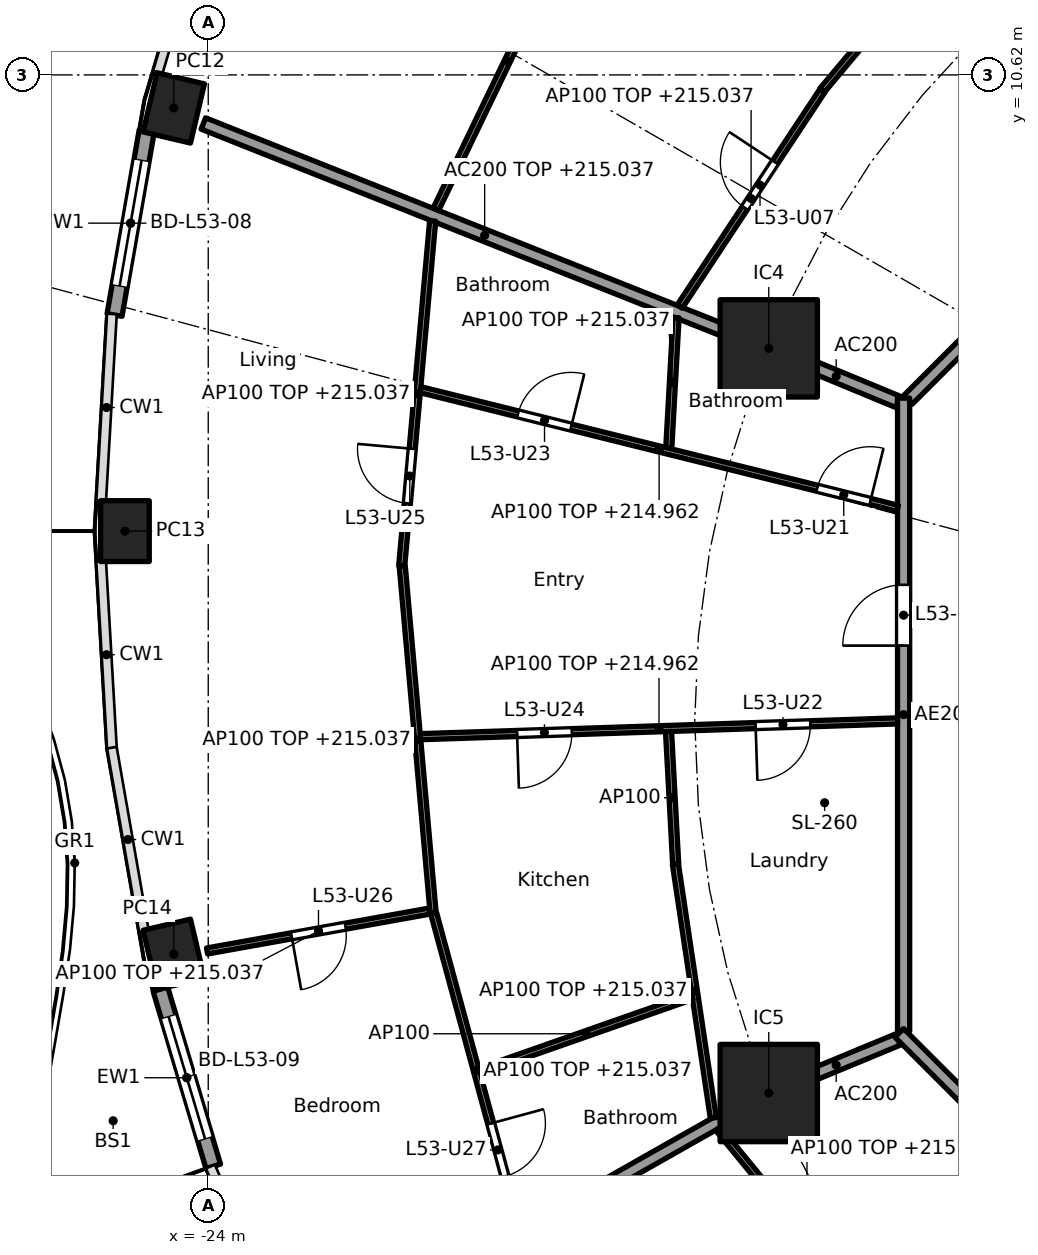
"""IFC4 building model, lengths in metres.
Left out: names, types, materials, properties, quantities, classifications, styles, units other than length and angle.
Written with IfcOpenShell. Run it as: python <this file> out.ifc"""

import sys

from ifc_helpers import new_model, si_unit, direction, frame, frame_2d, origin, origin_2d, place, context, subcontext, project, spatial, rectangle, hollow_rectangle, extrude, element, fill, save


model = new_model("IFC4")
c1 = context("Model", 3, precision=1e-05, world=origin(), true_north=direction((0.0, 1.0)))
c2 = subcontext(c1, "Body", "Model", "MODEL_VIEW")
j1 = project(units=[si_unit("LENGTHUNIT", "METRE"), si_unit("PLANEANGLEUNIT", "RADIAN")], contexts=[c1])
p1 = place(None, origin())
s1 = spatial("IfcSite", under=j1, at=p1, CompositionType="ELEMENT")
p2 = place(p1, origin())
s2 = spatial("IfcBuilding", under=s1, at=p2, CompositionType="ELEMENT")
p3 = place(p2, frame((0.0, 0.0, 212.2)))
s3 = spatial("IfcBuildingStorey", under=s2, at=p3, CompositionType="ELEMENT", Elevation=212.2)
for number, where, z_axis, x_axis in (
    (1, (-24.567, 10.077, -0.26), (0.0, 0.0, 1.0), (-0.229, -0.973, 0.0)),
    (2, (-25.37, 3.118, -0.26), (0.0, 0.0, 1.0), (0.0, -1.0, 0.0)),
    (3, (-24.567, -3.842, -0.26), (0.0, 0.0, 1.0), (0.229, -0.973, 0.0)),
):
    element("IfcColumn", number, at=place(p3, frame(where, z_axis=z_axis, x_axis=x_axis)), inside=s3, PredefinedType="COLUMN", context=c2, shape_type="SweptSolid", body=[
        extrude(hollow_rectangle(XDim=1.0, YDim=0.8, WallThickness=0.032, at=origin_2d()), origin(), (0.0, 0.0, 1.0), 3.96),
    ])
for number, where, z_axis, x_axis in (
    (4, (-14.782, 6.123, 0.0), (0.0, 0.0, 1.0), (1.0, 0.0, 0.0)),
    (5, (-14.782, -6.123, 0.0), (0.0, 0.0, 1.0), (1.0, 0.0, 0.0)),
):
    element("IfcColumn", number, at=place(p3, frame(where, z_axis=z_axis, x_axis=x_axis)), inside=s3, PredefinedType="COLUMN", context=c2, shape_type="SweptSolid", body=[
        extrude(rectangle(XDim=1.6, YDim=1.6, at=origin_2d()), origin(), (0.0, 0.0, 1.0), 3.7),
    ])
p4 = place(p3, frame((-25.541, 6.671, 0.0), z_axis=(0.0, 0.0, 1.0), x_axis=(0.172254823677, 0.985052422828, 0.0)))
e6 = element("IfcWall", 6, at=p4, inside=s3, PredefinedType="SOLIDWALL", context=c2, shape_type="SweptSolid", body=[
    extrude(rectangle(XDim=3.067, YDim=0.25, at=frame_2d((1.534, 0.0))), origin(), (0.0, 0.0, 1.0), 3.44),
])
p5 = place(p4, frame((0.484, 0.0, 0.0)))
e7 = element("IfcOpeningElement", 7, at=p5, cuts=e6, PredefinedType="OPENING", context=c2, shape_type="SweptSolid", body=[
    extrude(rectangle(XDim=2.1, YDim=2.4, at=frame_2d((1.05, 1.2))), frame((0.0, 0.135, 0.0), z_axis=(0.0, -1.0, 0.0), x_axis=(1.0, 0.0, 0.0)), (0.0, 0.0, 1.0), 0.27),
])
p6 = place(p3, frame((-23.918, -7.328, 0.0), z_axis=(0.0, 0.0, 1.0), x_axis=(-0.285859454825, 0.95827155446, 0.0)))
e8 = element("IfcWall", 8, at=p6, inside=s3, PredefinedType="SOLIDWALL", context=c2, shape_type="SweptSolid", body=[
    extrude(rectangle(XDim=3.041, YDim=0.25, at=frame_2d((1.52, 0.0))), origin(), (0.0, 0.0, 1.0), 3.44),
])
p7 = place(p6, frame((0.47, 0.0, 0.0)))
e9 = element("IfcOpeningElement", 9, at=p7, cuts=e8, PredefinedType="OPENING", context=c2, shape_type="SweptSolid", body=[
    extrude(rectangle(XDim=2.1, YDim=2.4, at=frame_2d((1.05, 1.2))), frame((0.0, 0.135, 0.0), z_axis=(0.0, -1.0, 0.0), x_axis=(1.0, 0.0, 0.0)), (0.0, 0.0, 1.0), 0.27),
])
p8 = place(p3, frame((-12.657, 5.243, 0.0), z_axis=(0.0, 0.0, 1.0), x_axis=(-0.923859888513, 0.38273085373, 0.0)))
e10 = element("IfcWall", 10, at=p8, inside=s3, PredefinedType="PARTITIONING", context=c2, shape_type="SweptSolid", body=[
    extrude(rectangle(XDim=2.199, YDim=0.2, at=frame_2d((1.1, 0.0))), origin(), (0.0, 0.0, 1.0), 3.44),
])
p9 = place(p3, frame((-14.829, 6.141, 0.0), z_axis=(0.0, 0.0, 1.0), x_axis=(-0.929202069098, 0.36957206981, 0.0)))
e11 = element("IfcWall", 11, at=p9, inside=s3, PredefinedType="PARTITIONING", context=c2, shape_type="SweptSolid", body=[
    extrude(rectangle(XDim=9.957, YDim=0.2, at=frame_2d((4.978, 0.0))), origin(), (0.0, 0.0, 1.0), 2.837),
])
p10 = place(p3, frame((-12.657, -5.243, 0.0), z_axis=(0.0, 0.0, 1.0), x_axis=(-0.923859888513, -0.38273085373, 0.0)))
e12 = element("IfcWall", 12, at=p10, inside=s3, PredefinedType="PARTITIONING", context=c2, shape_type="SweptSolid", body=[
    extrude(rectangle(XDim=2.199, YDim=0.2, at=frame_2d((1.1, 0.0))), origin(), (0.0, 0.0, 1.0), 3.44),
])
p11 = place(p3, frame((-14.825, -6.148, 0.0), z_axis=(0.0, 0.0, 1.0), x_axis=(-0.870099576105, -0.492875975944, 0.0)))
e13 = element("IfcWall", 13, at=p11, inside=s3, PredefinedType="PARTITIONING", context=c2, shape_type="SweptSolid", body=[
    extrude(rectangle(XDim=7.937, YDim=0.2, at=frame_2d((3.969, 0.0))), origin(), (0.0, 0.0, 1.0), 2.837),
])
p12 = place(p3, frame((-5.275, 12.494, 0.0), z_axis=(0.0, 0.0, 1.0), x_axis=(-0.707106781187, -0.707106781187, 0.0)))
e14 = element("IfcWall", 14, at=p12, inside=s3, PredefinedType="PARTITIONING", context=c2, shape_type="SweptSolid", body=[
    extrude(rectangle(XDim=10.209, YDim=0.2, at=frame_2d((5.104, 0.0))), origin(), (0.0, 0.0, 1.0), 3.44),
])
p13 = place(p12, frame((1.185, 0.0, 0.0)))
e15 = element("IfcOpeningElement", 15, at=p13, cuts=e14, PredefinedType="OPENING", context=c2, shape_type="SweptSolid", body=[
    extrude(rectangle(XDim=1.0, YDim=2.1, at=frame_2d((0.5, 1.05))), frame((0.0, 0.11, 0.0), z_axis=(0.0, -1.0, 0.0), x_axis=(1.0, 0.0, 0.0)), (0.0, 0.0, 1.0), 0.22),
])
p14 = place(p3, frame((-12.565, 5.304, 0.0), z_axis=(0.0, 0.0, 1.0), x_axis=(0.0, -1.0, 0.0)))
e16 = element("IfcWall", 16, at=p14, inside=s3, PredefinedType="PARTITIONING", context=c2, shape_type="SweptSolid", body=[
    extrude(rectangle(XDim=10.409, YDim=0.2, at=frame_2d((5.205, 0.0))), origin(), (0.0, 0.0, 1.0), 3.44),
])
p15 = place(p14, frame((3.07, 0.0, 0.0)))
e17 = element("IfcOpeningElement", 17, at=p15, cuts=e16, PredefinedType="OPENING", context=c2, shape_type="SweptSolid", body=[
    extrude(rectangle(XDim=1.0, YDim=2.1, at=frame_2d((0.5, 1.05))), frame((0.0, 0.11, 0.0), z_axis=(0.0, -1.0, 0.0), x_axis=(1.0, 0.0, 0.0)), (0.0, 0.0, 1.0), 0.22),
])
p16 = place(p3, frame((-12.635, -5.134, 0.0), z_axis=(0.0, 0.0, 1.0), x_axis=(0.707106781187, -0.707106781187, 0.0)))
e18 = element("IfcWall", 18, at=p16, inside=s3, PredefinedType="PARTITIONING", context=c2, shape_type="SweptSolid", body=[
    extrude(rectangle(XDim=10.609, YDim=0.2, at=frame_2d((5.305, 0.0))), origin(), (0.0, 0.0, 1.0), 3.44),
])
p17 = place(p3, frame((-7.725, 10.186, 0.0), z_axis=(0.0, 0.0, 1.0), x_axis=(-0.669819599194, 0.742523874725, 0.0)))
e19 = element("IfcWall", 19, at=p17, inside=s3, PredefinedType="PARTITIONING", context=c2, shape_type="SweptSolid", body=[
    extrude(rectangle(XDim=10.282, YDim=0.1, at=frame_2d((5.141, 0.0))), origin(), (0.0, 0.0, 1.0), 2.762),
])
p18 = place(p17, frame((2.0, 0.0, 0.0)))
e20 = element("IfcOpeningElement", 20, at=p18, cuts=e19, PredefinedType="OPENING", context=c2, shape_type="SweptSolid", body=[
    extrude(rectangle(XDim=0.9, YDim=2.1, at=frame_2d((0.45, 1.05))), frame((0.0, 0.06, 0.0), z_axis=(0.0, -1.0, 0.0), x_axis=(1.0, 0.0, 0.0)), (0.0, 0.0, 1.0), 0.12),
])
p19 = place(p17, frame((7.116, 0.0, 0.0)))
e21 = element("IfcOpeningElement", 21, at=p19, cuts=e19, PredefinedType="OPENING", context=c2, shape_type="SweptSolid", body=[
    extrude(rectangle(XDim=0.9, YDim=2.1, at=frame_2d((0.45, 1.05))), frame((0.0, 0.06, 0.0), z_axis=(0.0, -1.0, 0.0), x_axis=(1.0, 0.0, 0.0)), (0.0, 0.0, 1.0), 0.12),
])
p20 = place(p3, frame((-11.039, 13.785, 0.0), z_axis=(0.0, 0.0, 1.0), x_axis=(-0.642254625966, -0.766491353784, 0.0)))
e22 = element("IfcWall", 22, at=p20, inside=s3, PredefinedType="PARTITIONING", context=c2, shape_type="SweptSolid", body=[
    extrude(rectangle(XDim=4.461, YDim=0.1, at=frame_2d((2.23, 0.0))), origin(), (0.0, 0.0, 1.0), 2.837),
])
p21 = place(p3, frame((-13.899, 10.363, 0.0), z_axis=(0.0, 0.0, 1.0), x_axis=(-0.551267958114, -0.834328255758, 0.0)))
e23 = element("IfcWall", 23, at=p21, inside=s3, PredefinedType="PARTITIONING", context=c2, shape_type="SweptSolid", body=[
    extrude(rectangle(XDim=4.257, YDim=0.1, at=frame_2d((2.129, 0.0))), origin(), (0.0, 0.0, 1.0), 2.837),
])
p22 = place(p21, frame((1.413, 0.0, 0.0)))
e24 = element("IfcOpeningElement", 24, at=p22, cuts=e23, PredefinedType="OPENING", context=c2, shape_type="SweptSolid", body=[
    extrude(rectangle(XDim=0.9, YDim=2.1, at=frame_2d((0.45, 1.05))), frame((0.0, 0.06, 0.0), z_axis=(0.0, -1.0, 0.0), x_axis=(1.0, 0.0, 0.0)), (0.0, 0.0, 1.0), 0.12),
])
p23 = place(p3, frame((-17.904, 13.289, 0.0), z_axis=(0.0, 0.0, 1.0), x_axis=(-0.43429918566, -0.900768681369, 0.0)))
e25 = element("IfcWall", 25, at=p23, inside=s3, PredefinedType="PARTITIONING", context=c2, shape_type="SweptSolid", body=[
    extrude(rectangle(XDim=5.418, YDim=0.1, at=frame_2d((2.709, 0.0))), origin(), (0.0, 0.0, 1.0), 2.837),
])
p24 = place(p3, frame((-16.307, 6.627, 0.0), z_axis=(0.0, 0.0, 1.0), x_axis=(-0.055608865939, -0.998452629837, 0.0)))
e26 = element("IfcWall", 26, at=p24, inside=s3, PredefinedType="PARTITIONING", context=c2, shape_type="SweptSolid", body=[
    extrude(rectangle(XDim=2.143, YDim=0.1, at=frame_2d((1.071, 0.0))), origin(), (0.0, 0.0, 1.0), 2.837),
])
p25 = place(p3, frame((-20.31, 8.218, 0.0), z_axis=(0.0, 0.0, 1.0), x_axis=(-0.089284106956, -0.996006198899, 0.0)))
e27 = element("IfcWall", 27, at=p25, inside=s3, PredefinedType="PARTITIONING", context=c2, shape_type="SweptSolid", body=[
    extrude(rectangle(XDim=5.698, YDim=0.1, at=frame_2d((2.849, 0.0))), origin(), (0.0, 0.0, 1.0), 2.837),
])
p26 = place(p25, frame((3.761, 0.0, 0.0)))
e28 = element("IfcOpeningElement", 28, at=p26, cuts=e27, PredefinedType="OPENING", context=c2, shape_type="SweptSolid", body=[
    extrude(rectangle(XDim=0.9, YDim=2.1, at=frame_2d((0.45, 1.05))), frame((0.0, 0.06, 0.0), z_axis=(0.0, -1.0, 0.0), x_axis=(1.0, 0.0, 0.0)), (0.0, 0.0, 1.0), 0.12),
])
p27 = place(p3, frame((-12.662, 3.494, 0.0), z_axis=(0.0, 0.0, 1.0), x_axis=(-0.970505526029, 0.241078874951, 0.0)))
e29 = element("IfcWall", 29, at=p27, inside=s3, PredefinedType="PARTITIONING", context=c2, shape_type="SweptSolid", body=[
    extrude(rectangle(XDim=8.085, YDim=0.1, at=frame_2d((4.043, 0.0))), origin(), (0.0, 0.0, 1.0), 2.762),
])
p28 = place(p27, frame((0.464, 0.0, 0.0)))
e30 = element("IfcOpeningElement", 30, at=p28, cuts=e29, PredefinedType="OPENING", context=c2, shape_type="SweptSolid", body=[
    extrude(rectangle(XDim=0.9, YDim=2.1, at=frame_2d((0.45, 1.05))), frame((0.0, 0.06, 0.0), z_axis=(0.0, -1.0, 0.0), x_axis=(1.0, 0.0, 0.0)), (0.0, 0.0, 1.0), 0.12),
])
p29 = place(p27, frame((5.535, 0.0, 0.0)))
e31 = element("IfcOpeningElement", 31, at=p29, cuts=e29, PredefinedType="OPENING", context=c2, shape_type="SweptSolid", body=[
    extrude(rectangle(XDim=0.9, YDim=2.1, at=frame_2d((0.45, 1.05))), frame((0.0, 0.06, 0.0), z_axis=(0.0, -1.0, 0.0), x_axis=(1.0, 0.0, 0.0)), (0.0, 0.0, 1.0), 0.12),
])
p30 = place(p3, frame((-20.81, 2.542, 0.0), z_axis=(0.0, 0.0, 1.0), x_axis=(0.088651453697, -0.996062708748, 0.0)))
e32 = element("IfcWall", 32, at=p30, inside=s3, PredefinedType="PARTITIONING", context=c2, shape_type="SweptSolid", body=[
    extrude(rectangle(XDim=5.737, YDim=0.1, at=frame_2d((2.868, 0.0))), origin(), (0.0, 0.0, 1.0), 2.837),
])
p31 = place(p3, frame((-12.665, -0.003, 0.0), z_axis=(0.0, 0.0, 1.0), x_axis=(-0.999453263957, -0.033063169315, 0.0)))
e33 = element("IfcWall", 33, at=p31, inside=s3, PredefinedType="PARTITIONING", context=c2, shape_type="SweptSolid", body=[
    extrude(rectangle(XDim=7.849, YDim=0.1, at=frame_2d((3.925, 0.0))), origin(), (0.0, 0.0, 1.0), 2.762),
])
p32 = place(p31, frame((1.435, 0.0, 0.0)))
e34 = element("IfcOpeningElement", 34, at=p32, cuts=e33, PredefinedType="OPENING", context=c2, shape_type="SweptSolid", body=[
    extrude(rectangle(XDim=0.9, YDim=2.1, at=frame_2d((0.45, 1.05))), frame((0.0, 0.06, 0.0), z_axis=(0.0, -1.0, 0.0), x_axis=(1.0, 0.0, 0.0)), (0.0, 0.0, 1.0), 0.12),
])
p33 = place(p31, frame((5.36, 0.0, 0.0)))
e35 = element("IfcOpeningElement", 35, at=p33, cuts=e33, PredefinedType="OPENING", context=c2, shape_type="SweptSolid", body=[
    extrude(rectangle(XDim=0.9, YDim=2.1, at=frame_2d((0.45, 1.05))), frame((0.0, 0.06, 0.0), z_axis=(0.0, -1.0, 0.0), x_axis=(1.0, 0.0, 0.0)), (0.0, 0.0, 1.0), 0.12),
])
p34 = place(p3, frame((-16.431, -0.178, 0.0), z_axis=(0.0, 0.0, 1.0), x_axis=(0.053951127036, -0.998543577362, 0.0)))
e36 = element("IfcWall", 36, at=p34, inside=s3, PredefinedType="PARTITIONING", context=c2, shape_type="SweptSolid", body=[
    extrude(rectangle(XDim=2.181, YDim=0.1, at=frame_2d((1.091, 0.0))), origin(), (0.0, 0.0, 1.0), 3.44),
])
p35 = place(p3, frame((-16.318, -2.356, 0.0), z_axis=(0.0, 0.0, 1.0), x_axis=(0.147684413341, -0.989034536331, 0.0)))
e37 = element("IfcWall", 37, at=p35, inside=s3, PredefinedType="PARTITIONING", context=c2, shape_type="SweptSolid", body=[
    extrude(rectangle(XDim=4.222, YDim=0.1, at=frame_2d((2.111, 0.0))), origin(), (0.0, 0.0, 1.0), 2.837),
])
p36 = place(p3, frame((-20.355, -3.13, 0.0), z_axis=(0.0, 0.0, 1.0), x_axis=(-0.984331377639, -0.1763284974, 0.0)))
e38 = element("IfcWall", 38, at=p36, inside=s3, PredefinedType="PARTITIONING", context=c2, shape_type="SweptSolid", body=[
    extrude(rectangle(XDim=3.723, YDim=0.1, at=frame_2d((1.862, 0.0))), origin(), (0.0, 0.0, 1.0), 2.837),
])
p37 = place(p36, frame((1.412, 0.0, 0.0)))
e39 = element("IfcOpeningElement", 39, at=p37, cuts=e38, PredefinedType="OPENING", context=c2, shape_type="SweptSolid", body=[
    extrude(rectangle(XDim=0.9, YDim=2.1, at=frame_2d((0.45, 1.05))), frame((0.0, 0.06, 0.0), z_axis=(0.0, -1.0, 0.0), x_axis=(1.0, 0.0, 0.0)), (0.0, 0.0, 1.0), 0.12),
])
p38 = place(p3, frame((-20.292, -3.17, 0.0), z_axis=(0.0, 0.0, 1.0), x_axis=(0.26187906236, -0.965100697698, 0.0)))
e40 = element("IfcWall", 40, at=p38, inside=s3, PredefinedType="PARTITIONING", context=c2, shape_type="SweptSolid", body=[
    extrude(rectangle(XDim=5.356, YDim=0.1, at=frame_2d((2.678, 0.0))), origin(), (0.0, 0.0, 1.0), 2.837),
])
p39 = place(p38, frame((3.579, 0.0, 0.0)))
e41 = element("IfcOpeningElement", 41, at=p39, cuts=e40, PredefinedType="OPENING", context=c2, shape_type="SweptSolid", body=[
    extrude(rectangle(XDim=0.9, YDim=2.1, at=frame_2d((0.45, 1.05))), frame((0.0, 0.06, 0.0), z_axis=(0.0, -1.0, 0.0), x_axis=(1.0, 0.0, 0.0)), (0.0, 0.0, 1.0), 0.12),
])
p40 = place(p3, frame((-16.042, -4.535, 0.0), z_axis=(0.0, 0.0, 1.0), x_axis=(-0.94358986717, -0.331116539265, 0.0)))
e42 = element("IfcWall", 42, at=p40, inside=s3, PredefinedType="PARTITIONING", context=c2, shape_type="SweptSolid", body=[
    extrude(rectangle(XDim=3.704, YDim=0.1, at=frame_2d((1.852, 0.0))), origin(), (0.0, 0.0, 1.0), 3.44),
])
p41 = place(p3, frame((-15.616, -6.708, 0.0), z_axis=(0.0, 0.0, 1.0), x_axis=(0.634076422357, -0.773270386483, 0.0)))
e43 = element("IfcWall", 43, at=p41, inside=s3, PredefinedType="PARTITIONING", context=c2, shape_type="SweptSolid", body=[
    extrude(rectangle(XDim=4.611, YDim=0.1, at=frame_2d((2.306, 0.0))), origin(), (0.0, 0.0, 1.0), 2.837),
])
p42 = place(p41, frame((1.831, 0.0, 0.0)))
e44 = element("IfcOpeningElement", 44, at=p42, cuts=e43, PredefinedType="OPENING", context=c2, shape_type="SweptSolid", body=[
    extrude(rectangle(XDim=0.9, YDim=2.1, at=frame_2d((0.45, 1.05))), frame((0.0, 0.06, 0.0), z_axis=(0.0, -1.0, 0.0), x_axis=(1.0, 0.0, 0.0)), (0.0, 0.0, 1.0), 0.12),
])
p43 = place(p5, origin())
e45 = element("IfcDoor", 45, at=p43, inside=s3, OperationType="SLIDING_TO_LEFT", PredefinedType="DOOR", context=c2, shape_type="SweptSolid", body=[
    extrude(rectangle(XDim=2.1, YDim=2.4, at=frame_2d((1.05, 1.2))), frame((0.0, 0.025, 0.0), z_axis=(0.0, -1.0, 0.0), x_axis=(1.0, 0.0, 0.0)), (0.0, 0.0, 1.0), 0.05),
])
fill(e7, e45)
p44 = place(p7, origin())
e46 = element("IfcDoor", 46, at=p44, inside=s3, OperationType="SLIDING_TO_LEFT", PredefinedType="DOOR", context=c2, shape_type="SweptSolid", body=[
    extrude(rectangle(XDim=2.1, YDim=2.4, at=frame_2d((1.05, 1.2))), frame((0.0, 0.025, 0.0), z_axis=(0.0, -1.0, 0.0), x_axis=(1.0, 0.0, 0.0)), (0.0, 0.0, 1.0), 0.05),
])
fill(e9, e46)
p45 = place(p22, frame((0.9, 0.0, 0.0), x_axis=(-1.0, 0.0, 0.0)))
e47 = element("IfcDoor", 47, at=p45, inside=s3, OperationType="SINGLE_SWING_RIGHT", PredefinedType="DOOR", context=c2, shape_type="SweptSolid", body=[
    extrude(rectangle(XDim=0.9, YDim=2.1, at=frame_2d((0.45, 1.05))), frame((0.0, 0.025, 0.0), z_axis=(0.0, -1.0, 0.0), x_axis=(1.0, 0.0, 0.0)), (0.0, 0.0, 1.0), 0.05),
])
fill(e24, e47)
p46 = place(p15, frame((1.0, 0.0, 0.0), x_axis=(-1.0, 0.0, 0.0)))
e48 = element("IfcDoor", 48, at=p46, inside=s3, OperationType="SINGLE_SWING_LEFT", PredefinedType="DOOR", context=c2, shape_type="SweptSolid", body=[
    extrude(rectangle(XDim=1.0, YDim=2.1, at=frame_2d((0.5, 1.05))), frame((0.0, 0.025, 0.0), z_axis=(0.0, -1.0, 0.0), x_axis=(1.0, 0.0, 0.0)), (0.0, 0.0, 1.0), 0.05),
])
fill(e17, e48)
p47 = place(p28, frame((0.9, 0.0, 0.0), x_axis=(-1.0, 0.0, 0.0)))
e49 = element("IfcDoor", 49, at=p47, inside=s3, OperationType="SINGLE_SWING_RIGHT", PredefinedType="DOOR", context=c2, shape_type="SweptSolid", body=[
    extrude(rectangle(XDim=0.9, YDim=2.1, at=frame_2d((0.45, 1.05))), frame((0.0, 0.025, 0.0), z_axis=(0.0, -1.0, 0.0), x_axis=(1.0, 0.0, 0.0)), (0.0, 0.0, 1.0), 0.05),
])
fill(e30, e49)
p48 = place(p32, origin())
e50 = element("IfcDoor", 50, at=p48, inside=s3, OperationType="SINGLE_SWING_RIGHT", PredefinedType="DOOR", context=c2, shape_type="SweptSolid", body=[
    extrude(rectangle(XDim=0.9, YDim=2.1, at=frame_2d((0.45, 1.05))), frame((0.0, 0.025, 0.0), z_axis=(0.0, -1.0, 0.0), x_axis=(1.0, 0.0, 0.0)), (0.0, 0.0, 1.0), 0.05),
])
fill(e34, e50)
p49 = place(p29, frame((0.9, 0.0, 0.0), x_axis=(-1.0, 0.0, 0.0)))
e51 = element("IfcDoor", 51, at=p49, inside=s3, OperationType="SINGLE_SWING_RIGHT", PredefinedType="DOOR", context=c2, shape_type="SweptSolid", body=[
    extrude(rectangle(XDim=0.9, YDim=2.1, at=frame_2d((0.45, 1.05))), frame((0.0, 0.025, 0.0), z_axis=(0.0, -1.0, 0.0), x_axis=(1.0, 0.0, 0.0)), (0.0, 0.0, 1.0), 0.05),
])
fill(e31, e51)
p50 = place(p33, origin())
e52 = element("IfcDoor", 52, at=p50, inside=s3, OperationType="SINGLE_SWING_RIGHT", PredefinedType="DOOR", context=c2, shape_type="SweptSolid", body=[
    extrude(rectangle(XDim=0.9, YDim=2.1, at=frame_2d((0.45, 1.05))), frame((0.0, 0.025, 0.0), z_axis=(0.0, -1.0, 0.0), x_axis=(1.0, 0.0, 0.0)), (0.0, 0.0, 1.0), 0.05),
])
fill(e35, e52)
p51 = place(p26, frame((0.9, 0.0, 0.0), x_axis=(-1.0, 0.0, 0.0)))
e53 = element("IfcDoor", 53, at=p51, inside=s3, OperationType="SINGLE_SWING_RIGHT", PredefinedType="DOOR", context=c2, shape_type="SweptSolid", body=[
    extrude(rectangle(XDim=0.9, YDim=2.1, at=frame_2d((0.45, 1.05))), frame((0.0, 0.025, 0.0), z_axis=(0.0, -1.0, 0.0), x_axis=(1.0, 0.0, 0.0)), (0.0, 0.0, 1.0), 0.05),
])
fill(e28, e53)
p52 = place(p37, origin())
e54 = element("IfcDoor", 54, at=p52, inside=s3, OperationType="SINGLE_SWING_RIGHT", PredefinedType="DOOR", context=c2, shape_type="SweptSolid", body=[
    extrude(rectangle(XDim=0.9, YDim=2.1, at=frame_2d((0.45, 1.05))), frame((0.0, 0.025, 0.0), z_axis=(0.0, -1.0, 0.0), x_axis=(1.0, 0.0, 0.0)), (0.0, 0.0, 1.0), 0.05),
])
fill(e39, e54)
p53 = place(p39, origin())
e55 = element("IfcDoor", 55, at=p53, inside=s3, OperationType="SINGLE_SWING_LEFT", PredefinedType="DOOR", context=c2, shape_type="SweptSolid", body=[
    extrude(rectangle(XDim=0.9, YDim=2.1, at=frame_2d((0.45, 1.05))), frame((0.0, 0.025, 0.0), z_axis=(0.0, -1.0, 0.0), x_axis=(1.0, 0.0, 0.0)), (0.0, 0.0, 1.0), 0.05),
])
fill(e41, e55)
save(model, sys.argv[1])
